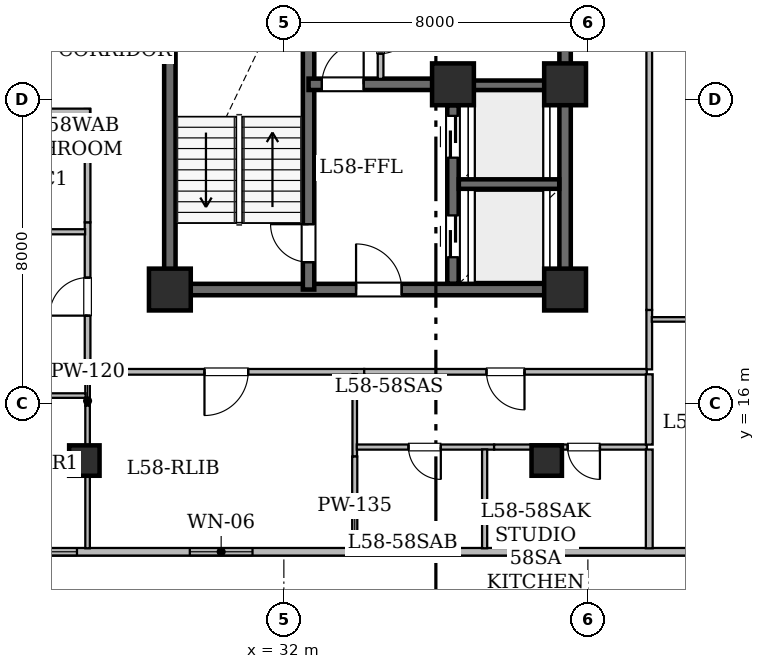
"""IFC4 building model, lengths in metres.
Left out: names, types, materials, properties, quantities, classifications, styles, units other than length and angle.
Written with IfcOpenShell. Run it as: python <this file> out.ifc"""

import sys

from ifc_helpers import new_model, si_unit, direction, frame, frame_2d, origin, origin_2d, place, context, subcontext, project, spatial, rectangle, hollow_rectangle, extrude, element, fill, save


model = new_model("IFC4")
c1 = context("Model", 3, precision=1e-05, world=origin(), true_north=direction((0.0, 1.0)))
c2 = subcontext(c1, "Body", "Model", "MODEL_VIEW")
j1 = project(units=[si_unit("LENGTHUNIT", "METRE"), si_unit("PLANEANGLEUNIT", "RADIAN")], contexts=[c1])
p1 = place(None, origin())
s1 = spatial("IfcSite", under=j1, at=p1, CompositionType="ELEMENT")
p2 = place(p1, origin())
s2 = spatial("IfcBuilding", under=s1, at=p2, CompositionType="ELEMENT")
p3 = place(p2, frame((0.0, 0.0, 228.15)))
s3 = spatial("IfcBuildingStorey", under=s2, at=p3, CompositionType="ELEMENT", Elevation=228.15)
for number, where, z_axis, x_axis in (
    (1, (29.0, 19.0, 0.0), (0.0, 0.0, 1.0), (1.0, 0.0, 0.0)),
    (2, (39.4, 19.0, 0.0), (0.0, 0.0, 1.0), (1.0, 0.0, 0.0)),
    (3, (36.45, 24.4, 0.0), (0.0, 0.0, 1.0), (1.0, 0.0, 0.0)),
    (4, (39.4, 24.4, 0.0), (0.0, 0.0, 1.0), (1.0, 0.0, 0.0)),
):
    element("IfcColumn", number, at=place(p3, frame(where, z_axis=z_axis, x_axis=x_axis)), inside=s3, PredefinedType="COLUMN", context=c2, shape_type="SweptSolid", body=[
        extrude(hollow_rectangle(XDim=1.1, YDim=1.1, WallThickness=0.055, at=origin_2d()), origin(), (0.0, 0.0, 1.0), 3.625),
    ])
for number, where, z_axis, x_axis in (
    (5, (26.75, 14.5, 0.0), (0.0, 0.0, 1.0), (1.0, 0.0, 0.0)),
    (6, (38.917, 14.5, 0.0), (0.0, 0.0, 1.0), (1.0, 0.0, 0.0)),
):
    element("IfcColumn", number, at=place(p3, frame(where, z_axis=z_axis, x_axis=x_axis)), inside=s3, PredefinedType="COLUMN", context=c2, shape_type="SweptSolid", body=[
        extrude(hollow_rectangle(XDim=0.8, YDim=0.8, WallThickness=0.04, at=origin_2d()), origin(), (0.0, 0.0, 1.0), 3.65),
    ])
p4 = place(p3, frame((65.696, 12.1, 0.0), z_axis=(0.0, 0.0, 1.0), x_axis=(-1.0, 0.0, 0.0)))
e7 = element("IfcWall", 7, at=p4, inside=s3, PredefinedType="STANDARD", context=c2, shape_type="SweptSolid", body=[
    extrude(rectangle(XDim=41.393, YDim=0.2, at=frame_2d((20.697, 0.0))), origin(), (0.0, 0.0, 1.0), 3.43),
])
p5 = place(p4, frame((34.521, 0.0, 0.85)))
e8 = element("IfcOpeningElement", 8, at=p5, cuts=e7, PredefinedType="OPENING", context=c2, shape_type="SweptSolid", body=[
    extrude(rectangle(XDim=1.65, YDim=1.55, at=frame_2d((0.825, 0.775))), frame((0.0, 0.11, 0.0), z_axis=(0.0, -1.0, 0.0), x_axis=(1.0, 0.0, 0.0)), (0.0, 0.0, 1.0), 0.22),
])
p6 = place(p4, frame((39.14, 0.0, 0.85)))
e9 = element("IfcOpeningElement", 9, at=p6, cuts=e7, PredefinedType="OPENING", context=c2, shape_type="SweptSolid", body=[
    extrude(rectangle(XDim=1.65, YDim=1.55, at=frame_2d((0.825, 0.775))), frame((0.0, 0.11, 0.0), z_axis=(0.0, -1.0, 0.0), x_axis=(1.0, 0.0, 0.0)), (0.0, 0.0, 1.0), 0.22),
])
p7 = place(p4, frame((15.596, 0.0, 0.8)))
e10 = element("IfcOpeningElement", 10, at=p7, cuts=e7, PredefinedType="OPENING", context=c2, shape_type="SweptSolid", body=[
    extrude(rectangle(XDim=1.2, YDim=1.5, at=frame_2d((0.6, 0.75))), frame((0.0, 0.11, 0.0), z_axis=(0.0, -1.0, 0.0), x_axis=(1.0, 0.0, 0.0)), (0.0, 0.0, 1.0), 0.22),
])
p8 = place(p4, frame((19.706, 0.0, 0.85)))
e11 = element("IfcOpeningElement", 11, at=p8, cuts=e7, PredefinedType="OPENING", context=c2, shape_type="SweptSolid", body=[
    extrude(rectangle(XDim=1.65, YDim=1.55, at=frame_2d((0.825, 0.775))), frame((0.0, 0.11, 0.0), z_axis=(0.0, -1.0, 0.0), x_axis=(1.0, 0.0, 0.0)), (0.0, 0.0, 1.0), 0.22),
])
p9 = place(p4, frame((11.036, 0.0, 0.85)))
e12 = element("IfcOpeningElement", 12, at=p9, cuts=e7, PredefinedType="OPENING", context=c2, shape_type="SweptSolid", body=[
    extrude(rectangle(XDim=1.65, YDim=1.55, at=frame_2d((0.825, 0.775))), frame((0.0, 0.11, 0.0), z_axis=(0.0, -1.0, 0.0), x_axis=(1.0, 0.0, 0.0)), (0.0, 0.0, 1.0), 0.22),
])
p10 = place(p4, frame((4.786, 0.0, 0.85)))
e13 = element("IfcOpeningElement", 13, at=p10, cuts=e7, PredefinedType="OPENING", context=c2, shape_type="SweptSolid", body=[
    extrude(rectangle(XDim=1.65, YDim=1.55, at=frame_2d((0.825, 0.775))), frame((0.0, 0.11, 0.0), z_axis=(0.0, -1.0, 0.0), x_axis=(1.0, 0.0, 0.0)), (0.0, 0.0, 1.0), 0.22),
])
p11 = place(p3, frame((29.0, 19.0, 0.0), z_axis=(0.0, 0.0, 1.0), x_axis=(0.0, 1.0, 0.0)))
e14 = element("IfcWall", 14, at=p11, inside=s3, PredefinedType="SHEAR", context=c2, shape_type="SweptSolid", body=[
    extrude(rectangle(XDim=9.0, YDim=0.3, at=frame_2d((4.5, 0.0))), origin(), (0.0, 0.0, 1.0), 3.43),
])
p12 = place(p3, frame((29.0, 19.0, 0.0), z_axis=(0.0, 0.0, 1.0), x_axis=(1.0, 0.0, 0.0)))
e15 = element("IfcWall", 15, at=p12, inside=s3, PredefinedType="SHEAR", context=c2, shape_type="SweptSolid", body=[
    extrude(rectangle(XDim=10.4, YDim=0.3, at=frame_2d((5.2, 0.0))), origin(), (0.0, 0.0, 1.0), 3.43),
])
p13 = place(p12, frame((4.9, 0.0, 0.0)))
e16 = element("IfcOpeningElement", 16, at=p13, cuts=e15, PredefinedType="OPENING", context=c2, shape_type="SweptSolid", body=[
    extrude(rectangle(XDim=1.2, YDim=2.15, at=frame_2d((0.6, 1.075))), frame((0.0, 0.16, 0.0), z_axis=(0.0, -1.0, 0.0), x_axis=(1.0, 0.0, 0.0)), (0.0, 0.0, 1.0), 0.32),
])
p14 = place(p3, frame((39.4, 19.0, 0.0), z_axis=(0.0, 0.0, 1.0), x_axis=(0.0, 1.0, 0.0)))
e17 = element("IfcWall", 17, at=p14, inside=s3, PredefinedType="SHEAR", context=c2, shape_type="SweptSolid", body=[
    extrude(rectangle(XDim=5.4, YDim=0.3, at=frame_2d((2.7, 0.0))), origin(), (0.0, 0.0, 1.0), 3.43),
])
p15 = place(p3, frame((39.4, 24.4, 0.0), z_axis=(0.0, 0.0, 1.0), x_axis=(0.0, 1.0, 0.0)))
e18 = element("IfcWall", 18, at=p15, inside=s3, PredefinedType="SHEAR", context=c2, shape_type="SweptSolid", body=[
    extrude(rectangle(XDim=12.6, YDim=0.3, at=frame_2d((6.3, 0.0))), origin(), (0.0, 0.0, 1.0), 3.43),
])
p16 = place(p3, frame((32.65, 19.0, 0.0), z_axis=(0.0, 0.0, 1.0), x_axis=(0.0, 1.0, 0.0)))
e19 = element("IfcWall", 19, at=p16, inside=s3, PredefinedType="SHEAR", context=c2, shape_type="SweptSolid", body=[
    extrude(rectangle(XDim=9.0, YDim=0.3, at=frame_2d((4.5, 0.0))), origin(), (0.0, 0.0, 1.0), 3.43),
])
p17 = place(p16, frame((0.72, 0.0, 0.0)))
e20 = element("IfcOpeningElement", 20, at=p17, cuts=e19, PredefinedType="OPENING", context=c2, shape_type="SweptSolid", body=[
    extrude(rectangle(XDim=1.0, YDim=2.15, at=frame_2d((0.5, 1.075))), frame((0.0, 0.16, 0.0), z_axis=(0.0, -1.0, 0.0), x_axis=(1.0, 0.0, 0.0)), (0.0, 0.0, 1.0), 0.32),
])
p18 = place(p3, frame((32.65, 24.4, 0.0), z_axis=(0.0, 0.0, 1.0), x_axis=(1.0, 0.0, 0.0)))
e21 = element("IfcWall", 21, at=p18, inside=s3, PredefinedType="SHEAR", context=c2, shape_type="SweptSolid", body=[
    extrude(rectangle(XDim=3.8, YDim=0.3, at=frame_2d((1.9, 0.0))), origin(), (0.0, 0.0, 1.0), 3.43),
])
p19 = place(p18, frame((0.35, 0.0, 0.0)))
e22 = element("IfcOpeningElement", 22, at=p19, cuts=e21, PredefinedType="OPENING", context=c2, shape_type="SweptSolid", body=[
    extrude(rectangle(XDim=1.1, YDim=2.15, at=frame_2d((0.55, 1.075))), frame((0.0, 0.16, 0.0), z_axis=(0.0, -1.0, 0.0), x_axis=(1.0, 0.0, 0.0)), (0.0, 0.0, 1.0), 0.32),
])
p20 = place(p3, frame((36.45, 19.154, 0.0), z_axis=(0.0, 0.0, 1.0), x_axis=(0.0, 1.0, 0.0)))
e23 = element("IfcWall", 23, at=p20, inside=s3, PredefinedType="SHEAR", context=c2, shape_type="SweptSolid", body=[
    extrude(rectangle(XDim=4.696, YDim=0.3, at=frame_2d((2.348, 0.0))), origin(), (0.0, 0.0, 1.0), 3.43),
])
p21 = place(p20, frame((0.696, 0.0, 0.0)))
e24 = element("IfcOpeningElement", 24, at=p21, cuts=e23, PredefinedType="OPENING", context=c2, shape_type="SweptSolid", body=[
    extrude(rectangle(XDim=1.1, YDim=2.15, at=frame_2d((0.55, 1.075))), frame((0.0, 0.16, 0.0), z_axis=(0.0, -1.0, 0.0), x_axis=(1.0, 0.0, 0.0)), (0.0, 0.0, 1.0), 0.32),
])
p22 = place(p20, frame((3.316, 0.0, 0.0)))
e25 = element("IfcOpeningElement", 25, at=p22, cuts=e23, PredefinedType="OPENING", context=c2, shape_type="SweptSolid", body=[
    extrude(rectangle(XDim=1.1, YDim=2.15, at=frame_2d((0.55, 1.075))), frame((0.0, 0.16, 0.0), z_axis=(0.0, -1.0, 0.0), x_axis=(1.0, 0.0, 0.0)), (0.0, 0.0, 1.0), 0.32),
])
for number, where, z_axis, x_axis in (
    (26, (36.604, 21.775, 0.0), (0.0, 0.0, 1.0), (1.0, 0.0, 0.0)),
    (27, (36.604, 24.375, 0.0), (0.0, 0.0, 1.0), (1.0, 0.0, 0.0)),
):
    element("IfcWall", number, at=place(p3, frame(where, z_axis=z_axis, x_axis=x_axis)), inside=s3, PredefinedType="SHEAR", context=c2, shape_type="SweptSolid", body=[
        extrude(rectangle(XDim=2.642, YDim=0.25, at=frame_2d((1.321, 0.0))), origin(), (0.0, 0.0, 1.0), 3.43),
    ])
p23 = place(p3, frame((34.545, 26.764, 0.0), z_axis=(0.0, 0.0, 1.0), x_axis=(0.0, -1.0, 0.0)))
e28 = element("IfcWall", 28, at=p23, inside=s3, PredefinedType="STANDARD", context=c2, shape_type="SweptSolid", body=[
    extrude(rectangle(XDim=2.22, YDim=0.15, at=frame_2d((1.11, 0.0))), origin(), (0.0, 0.0, 1.0), 3.43),
])
p24 = place(p23, frame((0.706, 0.0, 0.0)))
e29 = element("IfcOpeningElement", 29, at=p24, cuts=e28, PredefinedType="OPENING", context=c2, shape_type="SweptSolid", body=[
    extrude(rectangle(XDim=0.85, YDim=2.1, at=frame_2d((0.425, 1.05))), frame((0.0, 0.085, 0.0), z_axis=(0.0, -1.0, 0.0), x_axis=(1.0, 0.0, 0.0)), (0.0, 0.0, 1.0), 0.17),
])
p25 = place(p3, frame((34.114, 16.835, 0.0), z_axis=(0.0, 0.0, 1.0), x_axis=(-1.0, 0.0, 0.0)))
e30 = element("IfcWall", 30, at=p25, inside=s3, PredefinedType="STANDARD", context=c2, shape_type="SweptSolid", body=[
    extrude(rectangle(XDim=7.214, YDim=0.15, at=frame_2d((3.607, 0.0))), origin(), (0.0, 0.0, 1.0), 2.725),
])
p26 = place(p25, frame((3.053, 0.0, 0.0)))
e31 = element("IfcOpeningElement", 31, at=p26, cuts=e30, PredefinedType="OPENING", context=c2, shape_type="SweptSolid", body=[
    extrude(rectangle(XDim=1.15, YDim=2.2, at=frame_2d((0.575, 1.1))), frame((0.0, 0.085, 0.0), z_axis=(0.0, -1.0, 0.0), x_axis=(1.0, 0.0, 0.0)), (0.0, 0.0, 1.0), 0.17),
])
p27 = place(p3, frame((26.835, 16.9, 0.0), z_axis=(0.0, 0.0, 1.0), x_axis=(0.0, 1.0, 0.0)))
e32 = element("IfcWall", 32, at=p27, inside=s3, PredefinedType="STANDARD", context=c2, shape_type="SweptSolid", body=[
    extrude(rectangle(XDim=3.869, YDim=0.15, at=frame_2d((1.935, 0.0))), origin(), (0.0, 0.0, 1.0), 2.725),
])
p28 = place(p27, frame((1.413, 0.0, 0.0)))
e33 = element("IfcOpeningElement", 33, at=p28, cuts=e32, PredefinedType="OPENING", context=c2, shape_type="SweptSolid", body=[
    extrude(rectangle(XDim=1.0, YDim=2.15, at=frame_2d((0.5, 1.075))), frame((0.0, 0.085, 0.0), z_axis=(0.0, -1.0, 0.0), x_axis=(1.0, 0.0, 0.0)), (0.0, 0.0, 1.0), 0.17),
])
p29 = place(p3, frame((26.835, 20.769, 0.0), z_axis=(0.0, 0.0, 1.0), x_axis=(0.0, 1.0, 0.0)))
e34 = element("IfcWall", 34, at=p29, inside=s3, PredefinedType="STANDARD", context=c2, shape_type="SweptSolid", body=[
    extrude(rectangle(XDim=2.981, YDim=0.15, at=frame_2d((1.49, 0.0))), origin(), (0.0, 0.0, 1.0), 3.43),
])
p30 = place(p3, frame((26.898, 23.685, 0.0), z_axis=(0.0, 0.0, 1.0), x_axis=(-1.0, 0.0, 0.0)))
e35 = element("IfcWall", 35, at=p30, inside=s3, PredefinedType="STANDARD", context=c2, shape_type="SweptSolid", body=[
    extrude(rectangle(XDim=2.887, YDim=0.15, at=frame_2d((1.443, 0.0))), origin(), (0.0, 0.0, 1.0), 3.43),
])
p31 = place(p3, frame((41.55, 16.835, 0.0), z_axis=(0.0, 0.0, 1.0), x_axis=(-1.0, 0.0, 0.0)))
e36 = element("IfcWall", 36, at=p31, inside=s3, PredefinedType="STANDARD", context=c2, shape_type="SweptSolid", body=[
    extrude(rectangle(XDim=7.436, YDim=0.15, at=frame_2d((3.718, 0.0))), origin(), (0.0, 0.0, 1.0), 2.725),
])
p32 = place(p31, frame((3.218, 0.0, 0.0)))
e37 = element("IfcOpeningElement", 37, at=p32, cuts=e36, PredefinedType="OPENING", context=c2, shape_type="SweptSolid", body=[
    extrude(rectangle(XDim=1.0, YDim=2.15, at=frame_2d((0.5, 1.075))), frame((0.0, 0.085, 0.0), z_axis=(0.0, -1.0, 0.0), x_axis=(1.0, 0.0, 0.0)), (0.0, 0.0, 1.0), 0.17),
])
p33 = place(p3, frame((41.615, 18.463, 0.0), z_axis=(0.0, 0.0, 1.0), x_axis=(0.0, -1.0, 0.0)))
e38 = element("IfcWall", 38, at=p33, inside=s3, PredefinedType="STANDARD", context=c2, shape_type="SweptSolid", body=[
    extrude(rectangle(XDim=1.563, YDim=0.15, at=frame_2d((0.781, 0.0))), origin(), (0.0, 0.0, 1.0), 2.725),
])
p34 = place(p3, frame((41.615, 25.476, 0.0), z_axis=(0.0, 0.0, 1.0), x_axis=(0.0, -1.0, 0.0)))
e39 = element("IfcWall", 39, at=p34, inside=s3, PredefinedType="STANDARD", context=c2, shape_type="SweptSolid", body=[
    extrude(rectangle(XDim=7.013, YDim=0.15, at=frame_2d((3.507, 0.0))), origin(), (0.0, 0.0, 1.0), 2.725),
])
p35 = place(p3, frame((26.835, 15.947, 0.0), z_axis=(0.0, 0.0, 1.0), x_axis=(0.0, 1.0, 0.0)))
e40 = element("IfcWall", 40, at=p35, inside=s3, PredefinedType="PARTITIONING", context=c2, shape_type="SweptSolid", body=[
    extrude(rectangle(XDim=0.823, YDim=0.12, at=frame_2d((0.412, 0.0))), origin(), (0.0, 0.0, 1.0), 3.43),
])
p36 = place(p3, frame((26.835, 12.192, 0.0), z_axis=(0.0, 0.0, 1.0), x_axis=(0.0, 1.0, 0.0)))
e41 = element("IfcWall", 41, at=p36, inside=s3, PredefinedType="PARTITIONING", context=c2, shape_type="SweptSolid", body=[
    extrude(rectangle(XDim=3.755, YDim=0.12, at=frame_2d((1.877, 0.0))), origin(), (0.0, 0.0, 1.0), 2.725),
])
p37 = place(p3, frame((33.865, 16.77, 0.0), z_axis=(0.0, 0.0, 1.0), x_axis=(0.0, -1.0, 0.0)))
e42 = element("IfcWall", 42, at=p37, inside=s3, PredefinedType="PARTITIONING", context=c2, shape_type="SweptSolid", body=[
    extrude(rectangle(XDim=2.164, YDim=0.12, at=frame_2d((1.082, 0.0))), origin(), (0.0, 0.0, 1.0), 3.065),
])
p38 = place(p3, frame((33.865, 14.606, 0.0), z_axis=(0.0, 0.0, 1.0), x_axis=(0.0, -1.0, 0.0)))
e43 = element("IfcWall", 43, at=p38, inside=s3, PredefinedType="PARTITIONING", context=c2, shape_type="SweptSolid", body=[
    extrude(rectangle(XDim=2.414, YDim=0.135, at=frame_2d((1.207, 0.0))), origin(), (0.0, 0.0, 1.0), 2.887),
])
p39 = place(p3, frame((24.011, 20.52, 0.0), z_axis=(0.0, 0.0, 1.0), x_axis=(1.0, 0.0, 0.0)))
e44 = element("IfcWall", 44, at=p39, inside=s3, PredefinedType="PARTITIONING", context=c2, shape_type="SweptSolid", body=[
    extrude(rectangle(XDim=2.759, YDim=0.135, at=frame_2d((1.379, 0.0))), origin(), (0.0, 0.0, 1.0), 2.725),
])
p40 = place(p39, frame((0.975, 0.0, 0.0)))
e45 = element("IfcOpeningElement", 45, at=p40, cuts=e44, PredefinedType="OPENING", context=c2, shape_type="SweptSolid", body=[
    extrude(rectangle(XDim=0.85, YDim=2.1, at=frame_2d((0.425, 1.05))), frame((0.0, 0.077, 0.0), z_axis=(0.0, -1.0, 0.0), x_axis=(1.0, 0.0, 0.0)), (0.0, 0.0, 1.0), 0.155),
])
p41 = place(p3, frame((26.783, 16.21, 0.0), z_axis=(0.0, 0.0, 1.0), x_axis=(-1.0, 0.0, 0.0)))
e46 = element("IfcWall", 46, at=p41, inside=s3, PredefinedType="PARTITIONING", context=c2, shape_type="SweptSolid", body=[
    extrude(rectangle(XDim=6.391, YDim=0.12, at=frame_2d((3.195, 0.0))), origin(), (0.0, 0.0, 1.0), 2.887),
])
p42 = place(p41, frame((2.745, 0.0, 0.0)))
e47 = element("IfcOpeningElement", 47, at=p42, cuts=e46, PredefinedType="OPENING", context=c2, shape_type="SweptSolid", body=[
    extrude(rectangle(XDim=0.9, YDim=2.1, at=frame_2d((0.45, 1.05))), frame((0.0, 0.07, 0.0), z_axis=(0.0, -1.0, 0.0), x_axis=(1.0, 0.0, 0.0)), (0.0, 0.0, 1.0), 0.14),
])
p43 = place(p3, frame((37.532, 14.855, 0.0), z_axis=(0.0, 0.0, 1.0), x_axis=(-1.0, 0.0, 0.0)))
e48 = element("IfcWall", 48, at=p43, inside=s3, PredefinedType="PARTITIONING", context=c2, shape_type="SweptSolid", body=[
    extrude(rectangle(XDim=3.613, YDim=0.135, at=frame_2d((1.807, 0.0))), origin(), (0.0, 0.0, 1.0), 3.43),
])
p44 = place(p43, frame((1.402, 0.0, 0.0)))
e49 = element("IfcOpeningElement", 49, at=p44, cuts=e48, PredefinedType="OPENING", context=c2, shape_type="SweptSolid", body=[
    extrude(rectangle(XDim=0.85, YDim=2.1, at=frame_2d((0.425, 1.05))), frame((0.0, 0.077, 0.0), z_axis=(0.0, -1.0, 0.0), x_axis=(1.0, 0.0, 0.0)), (0.0, 0.0, 1.0), 0.155),
])
p45 = place(p3, frame((41.55, 14.855, 0.0), z_axis=(0.0, 0.0, 1.0), x_axis=(-1.0, 0.0, 0.0)))
e50 = element("IfcWall", 50, at=p45, inside=s3, PredefinedType="PARTITIONING", context=c2, shape_type="SweptSolid", body=[
    extrude(rectangle(XDim=4.018, YDim=0.135, at=frame_2d((2.009, 0.0))), origin(), (0.0, 0.0, 1.0), 2.725),
])
p46 = place(p45, frame((1.233, 0.0, 0.0)))
e51 = element("IfcOpeningElement", 51, at=p46, cuts=e50, PredefinedType="OPENING", context=c2, shape_type="SweptSolid", body=[
    extrude(rectangle(XDim=0.85, YDim=2.1, at=frame_2d((0.425, 1.05))), frame((0.0, 0.077, 0.0), z_axis=(0.0, -1.0, 0.0), x_axis=(1.0, 0.0, 0.0)), (0.0, 0.0, 1.0), 0.155),
])
p47 = place(p3, frame((41.615, 16.77, 0.0), z_axis=(0.0, 0.0, 1.0), x_axis=(0.0, -1.0, 0.0)))
e52 = element("IfcWall", 52, at=p47, inside=s3, PredefinedType="STANDARD", context=c2, shape_type="SweptSolid", body=[
    extrude(rectangle(XDim=1.85, YDim=0.18, at=frame_2d((0.925, 0.0))), origin(), (0.0, 0.0, 1.0), 3.065),
])
p48 = place(p3, frame((37.283, 14.793, 0.0), z_axis=(0.0, 0.0, 1.0), x_axis=(0.0, -1.0, 0.0)))
e53 = element("IfcWall", 53, at=p48, inside=s3, PredefinedType="PARTITIONING", context=c2, shape_type="SweptSolid", body=[
    extrude(rectangle(XDim=2.601, YDim=0.135, at=frame_2d((1.301, 0.0))), origin(), (0.0, 0.0, 1.0), 2.887),
])
p49 = place(p3, frame((41.615, 14.79, 0.0), z_axis=(0.0, 0.0, 1.0), x_axis=(0.0, -1.0, 0.0)))
e54 = element("IfcWall", 54, at=p49, inside=s3, PredefinedType="STANDARD", context=c2, shape_type="SweptSolid", body=[
    extrude(rectangle(XDim=2.598, YDim=0.18, at=frame_2d((1.299, 0.0))), origin(), (0.0, 0.0, 1.0), 2.887),
])
p50 = place(p3, frame((41.682, 18.214, 0.0), z_axis=(0.0, 0.0, 1.0), x_axis=(1.0, 0.0, 0.0)))
e55 = element("IfcWall", 55, at=p50, inside=s3, PredefinedType="PARTITIONING", context=c2, shape_type="SweptSolid", body=[
    extrude(rectangle(XDim=6.979, YDim=0.12, at=frame_2d((3.49, 0.0))), origin(), (0.0, 0.0, 1.0), 2.725),
])
p51 = place(p5, origin())
e56 = element("IfcWindow", 56, at=p51, inside=s3, PartitioningType="SINGLE_PANEL", PredefinedType="WINDOW", context=c2, shape_type="SweptSolid", body=[
    extrude(rectangle(XDim=1.65, YDim=1.55, at=frame_2d((0.825, 0.775))), frame((0.0, 0.03, 0.0), z_axis=(0.0, -1.0, 0.0), x_axis=(1.0, 0.0, 0.0)), (0.0, 0.0, 1.0), 0.06),
])
fill(e8, e56)
p52 = place(p6, origin())
e57 = element("IfcWindow", 57, at=p52, inside=s3, PartitioningType="SINGLE_PANEL", PredefinedType="WINDOW", context=c2, shape_type="SweptSolid", body=[
    extrude(rectangle(XDim=1.65, YDim=1.55, at=frame_2d((0.825, 0.775))), frame((0.0, 0.03, 0.0), z_axis=(0.0, -1.0, 0.0), x_axis=(1.0, 0.0, 0.0)), (0.0, 0.0, 1.0), 0.06),
])
fill(e9, e57)
p53 = place(p17, origin())
e58 = element("IfcDoor", 58, at=p53, inside=s3, OperationType="SINGLE_SWING_RIGHT", PredefinedType="DOOR", context=c2, shape_type="SweptSolid", body=[
    extrude(rectangle(XDim=1.0, YDim=2.15, at=frame_2d((0.5, 1.075))), frame((0.0, 0.025, 0.0), z_axis=(0.0, -1.0, 0.0), x_axis=(1.0, 0.0, 0.0)), (0.0, 0.0, 1.0), 0.05),
])
fill(e20, e58)
p54 = place(p19, origin())
e59 = element("IfcDoor", 59, at=p54, inside=s3, OperationType="SINGLE_SWING_RIGHT", PredefinedType="DOOR", context=c2, shape_type="SweptSolid", body=[
    extrude(rectangle(XDim=1.1, YDim=2.15, at=frame_2d((0.55, 1.075))), frame((0.0, 0.025, 0.0), z_axis=(0.0, -1.0, 0.0), x_axis=(1.0, 0.0, 0.0)), (0.0, 0.0, 1.0), 0.05),
])
fill(e22, e59)
p55 = place(p13, origin())
e60 = element("IfcDoor", 60, at=p55, inside=s3, OperationType="SINGLE_SWING_LEFT", PredefinedType="DOOR", context=c2, shape_type="SweptSolid", body=[
    extrude(rectangle(XDim=1.2, YDim=2.15, at=frame_2d((0.6, 1.075))), frame((0.0, 0.025, 0.0), z_axis=(0.0, -1.0, 0.0), x_axis=(1.0, 0.0, 0.0)), (0.0, 0.0, 1.0), 0.05),
])
fill(e16, e60)
p56 = place(p21, origin())
e61 = element("IfcDoor", 61, at=p56, inside=s3, OperationType="SLIDING_TO_LEFT", PredefinedType="DOOR", context=c2, shape_type="SweptSolid", body=[
    extrude(rectangle(XDim=1.1, YDim=2.15, at=frame_2d((0.55, 1.075))), frame((0.0, 0.025, 0.0), z_axis=(0.0, -1.0, 0.0), x_axis=(1.0, 0.0, 0.0)), (0.0, 0.0, 1.0), 0.05),
])
fill(e24, e61)
p57 = place(p22, origin())
e62 = element("IfcDoor", 62, at=p57, inside=s3, OperationType="SLIDING_TO_LEFT", PredefinedType="DOOR", context=c2, shape_type="SweptSolid", body=[
    extrude(rectangle(XDim=1.1, YDim=2.15, at=frame_2d((0.55, 1.075))), frame((0.0, 0.025, 0.0), z_axis=(0.0, -1.0, 0.0), x_axis=(1.0, 0.0, 0.0)), (0.0, 0.0, 1.0), 0.05),
])
fill(e25, e62)
p58 = place(p24, origin())
e63 = element("IfcDoor", 63, at=p58, inside=s3, OperationType="SINGLE_SWING_LEFT", PredefinedType="DOOR", context=c2, shape_type="SweptSolid", body=[
    extrude(rectangle(XDim=0.85, YDim=2.1, at=frame_2d((0.425, 1.05))), frame((0.0, 0.025, 0.0), z_axis=(0.0, -1.0, 0.0), x_axis=(1.0, 0.0, 0.0)), (0.0, 0.0, 1.0), 0.05),
])
fill(e29, e63)
p59 = place(p26, origin())
e64 = element("IfcDoor", 64, at=p59, inside=s3, OperationType="SINGLE_SWING_RIGHT", PredefinedType="DOOR", context=c2, shape_type="SweptSolid", body=[
    extrude(rectangle(XDim=1.15, YDim=2.2, at=frame_2d((0.575, 1.1))), frame((0.0, 0.025, 0.0), z_axis=(0.0, -1.0, 0.0), x_axis=(1.0, 0.0, 0.0)), (0.0, 0.0, 1.0), 0.05),
])
fill(e31, e64)
p60 = place(p28, origin())
e65 = element("IfcDoor", 65, at=p60, inside=s3, OperationType="SINGLE_SWING_LEFT", PredefinedType="DOOR", context=c2, shape_type="SweptSolid", body=[
    extrude(rectangle(XDim=1.0, YDim=2.15, at=frame_2d((0.5, 1.075))), frame((0.0, 0.025, 0.0), z_axis=(0.0, -1.0, 0.0), x_axis=(1.0, 0.0, 0.0)), (0.0, 0.0, 1.0), 0.05),
])
fill(e33, e65)
p61 = place(p32, origin())
e66 = element("IfcDoor", 66, at=p61, inside=s3, OperationType="SINGLE_SWING_LEFT", PredefinedType="DOOR", context=c2, shape_type="SweptSolid", body=[
    extrude(rectangle(XDim=1.0, YDim=2.15, at=frame_2d((0.5, 1.075))), frame((0.0, 0.025, 0.0), z_axis=(0.0, -1.0, 0.0), x_axis=(1.0, 0.0, 0.0)), (0.0, 0.0, 1.0), 0.05),
])
fill(e37, e66)
p62 = place(p44, origin())
e67 = element("IfcDoor", 67, at=p62, inside=s3, OperationType="SINGLE_SWING_LEFT", PredefinedType="DOOR", context=c2, shape_type="SweptSolid", body=[
    extrude(rectangle(XDim=0.85, YDim=2.1, at=frame_2d((0.425, 1.05))), frame((0.0, 0.025, 0.0), z_axis=(0.0, -1.0, 0.0), x_axis=(1.0, 0.0, 0.0)), (0.0, 0.0, 1.0), 0.05),
])
fill(e49, e67)
p63 = place(p46, origin())
e68 = element("IfcDoor", 68, at=p63, inside=s3, OperationType="SINGLE_SWING_LEFT", PredefinedType="DOOR", context=c2, shape_type="SweptSolid", body=[
    extrude(rectangle(XDim=0.85, YDim=2.1, at=frame_2d((0.425, 1.05))), frame((0.0, 0.025, 0.0), z_axis=(0.0, -1.0, 0.0), x_axis=(1.0, 0.0, 0.0)), (0.0, 0.0, 1.0), 0.05),
])
fill(e51, e68)
save(model, sys.argv[1])
